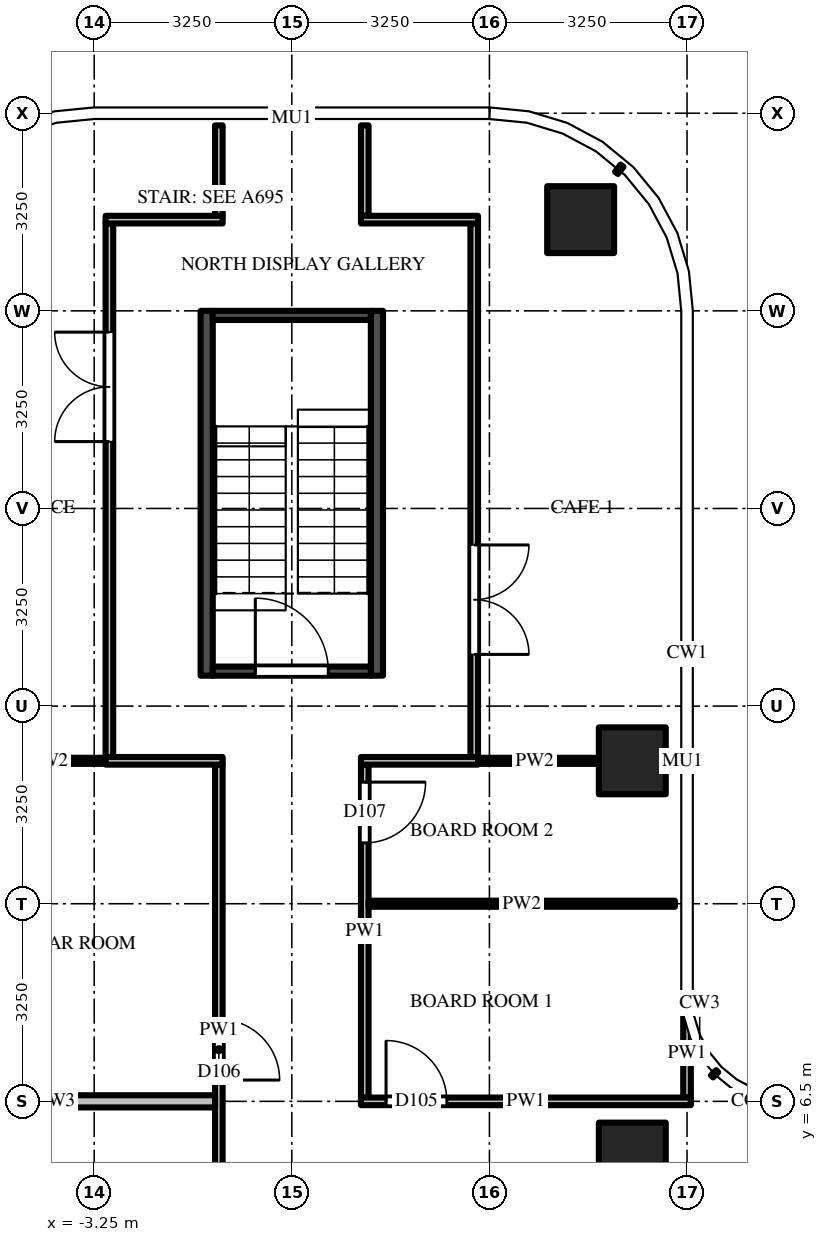
"""IFC4 building model, lengths in metres.
Left out: names, types, materials, properties, quantities, classifications, styles, units other than length and angle.
Written with IfcOpenShell. Run it as: python <this file> out.ifc"""

import sys

from ifc_helpers import new_model, si_unit, direction, frame, frame_2d, origin, origin_2d, place, context, subcontext, project, spatial, rectangle, extrude, source, transform, mapped, element, fill, save


model = new_model("IFC4")
c1 = context("Model", 3, precision=1e-05, world=origin(), true_north=direction((0.0, 1.0)))
c2 = subcontext(c1, "Body", "Model", "MODEL_VIEW")
j1 = project(units=[si_unit("LENGTHUNIT", "METRE"), si_unit("PLANEANGLEUNIT", "RADIAN")], contexts=[c1])
p1 = place(None, origin())
s1 = spatial("IfcSite", under=j1, at=p1, CompositionType="ELEMENT")
p2 = place(p1, origin())
s2 = spatial("IfcBuilding", under=s1, at=p2, CompositionType="ELEMENT")
p3 = place(p2, frame((0.0, 0.0, 244.1)))
s3 = spatial("IfcBuildingStorey", under=s2, at=p3, CompositionType="ELEMENT", Elevation=244.1)
m1 = source(origin(), c2, "Body", "SweptSolid", [
    extrude(rectangle(XDim=1.1, YDim=1.1, at=origin_2d()), origin(), (0.0, 0.0, 1.0), 3.9),
])
for number, where, z_axis, x_axis in (
    (1, (5.6, 12.1, 0.0), (0.0, 0.0, 1.0), (1.0, 0.0, 0.0)),
    (2, (4.75, 21.0, 0.0), (0.0, 0.0, 1.0), (1.0, 0.0, 0.0)),
    (3, (5.6, 5.6, 0.0), (0.0, 0.0, 1.0), (1.0, 0.0, 0.0)),
):
    element("IfcColumn", number, at=place(p3, frame(where, z_axis=z_axis, x_axis=x_axis)), inside=s3, PredefinedType="COLUMN", context=c2, shape_type="MappedRepresentation", body=[
        mapped(m1, transform((0.0, 0.0, 0.0))),
    ])
m2 = source(origin(), c2, "Body", "SweptSolid", [
    extrude(rectangle(XDim=6.0, YDim=0.2, at=frame_2d((3.0, 0.0))), origin(), (0.0, 0.0, 1.0), 3.7),
])
for number, where, z_axis, x_axis in (
    (4, (-1.4, 13.5, 0.0), (0.0, 0.0, 1.0), (0.0, 1.0, 0.0)),
    (5, (1.4, 13.5, 0.0), (0.0, 0.0, 1.0), (0.0, 1.0, 0.0)),
):
    element("IfcWall", number, at=place(p3, frame(where, z_axis=z_axis, x_axis=x_axis)), inside=s3, PredefinedType="SHEAR", context=c2, shape_type="MappedRepresentation", body=[
        mapped(m2, transform((0.0, 0.0, 0.0))),
    ])
m3 = source(origin(), c2, "Body", "SweptSolid", [
    extrude(rectangle(XDim=2.6, YDim=0.15, at=frame_2d((1.3, 0.0))), origin(), (0.0, 0.0, 1.0), 3.7),
])
p4 = place(p3, frame((-1.3, 13.575, 0.0), z_axis=(0.0, 0.0, 1.0), x_axis=(1.0, 0.0, 0.0)))
e6 = element("IfcWall", 6, at=p4, inside=s3, PredefinedType="SHEAR", context=c2, shape_type="MappedRepresentation", body=[
    mapped(m3, transform((0.0, 0.0, 0.0))),
])
m4 = source(origin(), c2, "Body", "SweptSolid", [
    extrude(rectangle(XDim=1.2, YDim=2.1, at=frame_2d((0.6, 1.05))), frame((0.0, 0.085, 0.0), z_axis=(0.0, -1.0, 0.0), x_axis=(1.0, 0.0, 0.0)), (0.0, 0.0, 1.0), 0.17),
])
p5 = place(p4, frame((0.7, 0.0, 0.0)))
e7 = element("IfcOpeningElement", 7, at=p5, cuts=e6, PredefinedType="OPENING", context=c2, shape_type="MappedRepresentation", body=[
    mapped(m4, transform((0.0, 0.0, 0.0))),
])
p6 = place(p3, frame((-1.3, 19.425, 0.0), z_axis=(0.0, 0.0, 1.0), x_axis=(1.0, 0.0, 0.0)))
e8 = element("IfcWall", 8, at=p6, inside=s3, PredefinedType="SHEAR", context=c2, shape_type="MappedRepresentation", body=[
    mapped(m3, transform((0.0, 0.0, 0.0))),
])
m5 = source(origin(), c2, "Body", "SweptSolid", [
    extrude(rectangle(XDim=8.788, YDim=0.125, at=frame_2d((4.394, 0.0))), origin(), (0.0, 0.0, 1.0), 2.78),
])
p7 = place(p3, frame((-3.0, 12.15, 0.0), z_axis=(0.0, 0.0, 1.0), x_axis=(0.0, 1.0, 0.0)))
e9 = element("IfcWall", 9, at=p7, inside=s3, PredefinedType="PARTITIONING", context=c2, shape_type="MappedRepresentation", body=[
    mapped(m5, transform((0.0, 0.0, 0.0))),
])
m6 = source(origin(), c2, "Body", "SweptSolid", [
    extrude(rectangle(XDim=1.8, YDim=2.1, at=frame_2d((0.9, 1.05))), frame((0.0, 0.073, 0.0), z_axis=(0.0, -1.0, 0.0), x_axis=(1.0, 0.0, 0.0)), (0.0, 0.0, 1.0), 0.145),
])
p8 = place(p7, frame((5.2, 0.0, 0.0)))
e10 = element("IfcOpeningElement", 10, at=p8, cuts=e9, PredefinedType="OPENING", context=c2, shape_type="MappedRepresentation", body=[
    mapped(m6, transform((0.0, 0.0, 0.0))),
])
m7 = source(origin(), c2, "Body", "SweptSolid", [
    extrude(rectangle(XDim=8.725, YDim=0.125, at=frame_2d((4.363, 0.0))), origin(), (0.0, 0.0, 1.0), 2.997),
])
p9 = place(p3, frame((-1.2, 12.038, 0.0), z_axis=(0.0, 0.0, 1.0), x_axis=(0.0, -1.0, 0.0)))
e11 = element("IfcWall", 11, at=p9, inside=s3, PredefinedType="PARTITIONING", context=c2, shape_type="MappedRepresentation", body=[
    mapped(m7, transform((0.0, 0.0, 0.0))),
])
m8 = source(origin(), c2, "Body", "SweptSolid", [
    extrude(rectangle(XDim=1.0, YDim=2.1, at=frame_2d((0.5, 1.05))), frame((0.0, 0.073, 0.0), z_axis=(0.0, -1.0, 0.0), x_axis=(1.0, 0.0, 0.0)), (0.0, 0.0, 1.0), 0.145),
])
p10 = place(p9, frame((4.188, 0.0, 0.0)))
e12 = element("IfcOpeningElement", 12, at=p10, cuts=e11, PredefinedType="OPENING", context=c2, shape_type="MappedRepresentation", body=[
    mapped(m8, transform((0.0, 0.0, 0.0))),
])
m9 = source(origin(), c2, "Body", "SweptSolid", [
    extrude(rectangle(XDim=1.488, YDim=0.125, at=frame_2d((0.744, 0.0))), origin(), (0.0, 0.0, 1.0), 2.78),
])
p11 = place(p3, frame((-1.2, 22.55, 0.0), z_axis=(0.0, 0.0, 1.0), x_axis=(0.0, -1.0, 0.0)))
e13 = element("IfcWall", 13, at=p11, inside=s3, PredefinedType="PARTITIONING", context=c2, shape_type="MappedRepresentation", body=[
    mapped(m9, transform((0.0, 0.0, 0.0))),
])
m10 = source(origin(), c2, "Body", "SweptSolid", [
    extrude(rectangle(XDim=5.475, YDim=0.125, at=frame_2d((2.738, 0.0))), origin(), (0.0, 0.0, 1.0), 2.997),
])
p12 = place(p3, frame((1.2, 12.038, 0.0), z_axis=(0.0, 0.0, 1.0), x_axis=(0.0, -1.0, 0.0)))
e14 = element("IfcWall", 14, at=p12, inside=s3, PredefinedType="PARTITIONING", context=c2, shape_type="MappedRepresentation", body=[
    mapped(m10, transform((0.0, 0.0, 0.0))),
])
p13 = place(p12, frame((0.288, 0.0, 0.0)))
e15 = element("IfcOpeningElement", 15, at=p13, cuts=e14, PredefinedType="OPENING", context=c2, shape_type="MappedRepresentation", body=[
    mapped(m8, transform((0.0, 0.0, 0.0))),
])
p14 = place(p3, frame((1.2, 22.55, 0.0), z_axis=(0.0, 0.0, 1.0), x_axis=(0.0, -1.0, 0.0)))
e16 = element("IfcWall", 16, at=p14, inside=s3, PredefinedType="PARTITIONING", context=c2, shape_type="MappedRepresentation", body=[
    mapped(m9, transform((0.0, 0.0, 0.0))),
])
p15 = place(p3, frame((3.0, 20.938, 0.0), z_axis=(0.0, 0.0, 1.0), x_axis=(0.0, -1.0, 0.0)))
e17 = element("IfcWall", 17, at=p15, inside=s3, PredefinedType="PARTITIONING", context=c2, shape_type="MappedRepresentation", body=[
    mapped(m5, transform((0.0, 0.0, 0.0))),
])
p16 = place(p15, frame((5.288, 0.0, 0.0)))
e18 = element("IfcOpeningElement", 18, at=p16, cuts=e17, PredefinedType="OPENING", context=c2, shape_type="MappedRepresentation", body=[
    mapped(m6, transform((0.0, 0.0, 0.0))),
])
m11 = source(origin(), c2, "Body", "SweptSolid", [
    extrude(rectangle(XDim=1.469, YDim=0.125, at=frame_2d((0.734, 0.0))), origin(), (0.0, 0.0, 1.0), 3.7),
])
p17 = place(p3, frame((6.5, 6.562, 0.0), z_axis=(0.0, 0.0, 1.0), x_axis=(0.0, 1.0, 0.0)))
e19 = element("IfcWall", 19, at=p17, inside=s3, PredefinedType="PARTITIONING", context=c2, shape_type="MappedRepresentation", body=[
    mapped(m11, transform((0.0, 0.0, 0.0))),
])
m12 = source(origin(), c2, "Body", "SweptSolid", [
    extrude(rectangle(XDim=5.238, YDim=0.2, at=frame_2d((2.619, 0.0))), origin(), (0.0, 0.0, 1.0), 2.78),
])
p18 = place(p3, frame((-6.5, 6.5, 0.0), z_axis=(0.0, 0.0, 1.0), x_axis=(1.0, 0.0, 0.0)))
e20 = element("IfcWall", 20, at=p18, inside=s3, PredefinedType="PARTITIONING", context=c2, shape_type="MappedRepresentation", body=[
    mapped(m12, transform((0.0, 0.0, 0.0))),
])
m13 = source(origin(), c2, "Body", "SweptSolid", [
    extrude(rectangle(XDim=5.425, YDim=0.125, at=frame_2d((2.712, 0.0))), origin(), (0.0, 0.0, 1.0), 2.78),
])
p19 = place(p3, frame((1.137, 6.5, 0.0), z_axis=(0.0, 0.0, 1.0), x_axis=(1.0, 0.0, 0.0)))
e21 = element("IfcWall", 21, at=p19, inside=s3, PredefinedType="PARTITIONING", context=c2, shape_type="MappedRepresentation", body=[
    mapped(m13, transform((0.0, 0.0, 0.0))),
])
p20 = place(p19, frame((0.413, 0.0, 0.0)))
e22 = element("IfcOpeningElement", 22, at=p20, cuts=e21, PredefinedType="OPENING", context=c2, shape_type="MappedRepresentation", body=[
    mapped(m8, transform((0.0, 0.0, 0.0))),
])
m14 = source(origin(), c2, "Body", "SweptSolid", [
    extrude(rectangle(XDim=5.038, YDim=0.1, at=frame_2d((2.519, 0.0))), origin(), (0.0, 0.0, 1.0), 2.78),
])
p21 = place(p3, frame((1.262, 9.75, 0.0), z_axis=(0.0, 0.0, 1.0), x_axis=(1.0, 0.0, 0.0)))
e23 = element("IfcWall", 23, at=p21, inside=s3, PredefinedType="PARTITIONING", context=c2, shape_type="MappedRepresentation", body=[
    mapped(m14, transform((0.0, 0.0, 0.0))),
])
m15 = source(origin(), c2, "Body", "SweptSolid", [
    extrude(rectangle(XDim=2.113, YDim=0.1, at=frame_2d((1.056, 0.0))), origin(), (0.0, 0.0, 1.0), 2.997),
])
for number, where, z_axis, x_axis in (
    (24, (-5.05, 12.1, 0.0), (0.0, 0.0, 1.0), (1.0, 0.0, 0.0)),
    (25, (2.938, 12.1, 0.0), (0.0, 0.0, 1.0), (1.0, 0.0, 0.0)),
):
    element("IfcWall", number, at=place(p3, frame(where, z_axis=z_axis, x_axis=x_axis)), inside=s3, PredefinedType="PARTITIONING", context=c2, shape_type="MappedRepresentation", body=[
        mapped(m15, transform((0.0, 0.0, 0.0))),
    ])
m16 = source(origin(), c2, "Body", "SweptSolid", [
    extrude(rectangle(XDim=1.925, YDim=0.125, at=frame_2d((0.962, 0.0))), origin(), (0.0, 0.0, 1.0), 2.997),
])
for number, where, z_axis, x_axis in (
    (26, (-1.137, 12.1, 0.0), (0.0, 0.0, 1.0), (-1.0, 0.0, 0.0)),
    (27, (3.062, 12.1, 0.0), (0.0, 0.0, 1.0), (-1.0, 0.0, 0.0)),
):
    element("IfcWall", number, at=place(p3, frame(where, z_axis=z_axis, x_axis=x_axis)), inside=s3, PredefinedType="PARTITIONING", context=c2, shape_type="MappedRepresentation", body=[
        mapped(m16, transform((0.0, 0.0, 0.0))),
    ])
m17 = source(origin(), c2, "Body", "SweptSolid", [
    extrude(rectangle(XDim=1.925, YDim=0.125, at=frame_2d((0.962, 0.0))), origin(), (0.0, 0.0, 1.0), 2.78),
])
for number, where, z_axis, x_axis in (
    (28, (-3.062, 21.0, 0.0), (0.0, 0.0, 1.0), (1.0, 0.0, 0.0)),
    (29, (1.137, 21.0, 0.0), (0.0, 0.0, 1.0), (1.0, 0.0, 0.0)),
):
    element("IfcWall", number, at=place(p3, frame(where, z_axis=z_axis, x_axis=x_axis)), inside=s3, PredefinedType="PARTITIONING", context=c2, shape_type="MappedRepresentation", body=[
        mapped(m17, transform((0.0, 0.0, 0.0))),
    ])
m18 = source(origin(), c2, "Body", "SweptSolid", [
    extrude(rectangle(XDim=1.2, YDim=2.1, at=frame_2d((0.6, 1.05))), frame((0.0, 0.025, 0.0), z_axis=(0.0, -1.0, 0.0), x_axis=(1.0, 0.0, 0.0)), (0.0, 0.0, 1.0), 0.05),
])
p22 = place(p5, origin())
e30 = element("IfcDoor", 30, at=p22, inside=s3, OperationType="SINGLE_SWING_LEFT", PredefinedType="DOOR", context=c2, shape_type="MappedRepresentation", body=[
    mapped(m18, transform((0.0, 0.0, 0.0))),
])
fill(e7, e30)
m19 = source(origin(), c2, "Body", "SweptSolid", [
    extrude(rectangle(XDim=1.0, YDim=2.1, at=frame_2d((0.5, 1.05))), frame((0.0, 0.025, 0.0), z_axis=(0.0, -1.0, 0.0), x_axis=(1.0, 0.0, 0.0)), (0.0, 0.0, 1.0), 0.05),
])
p23 = place(p20, origin())
e31 = element("IfcDoor", 31, at=p23, inside=s3, OperationType="SINGLE_SWING_LEFT", PredefinedType="DOOR", context=c2, shape_type="MappedRepresentation", body=[
    mapped(m19, transform((0.0, 0.0, 0.0))),
])
fill(e22, e31)
p24 = place(p10, origin())
e32 = element("IfcDoor", 32, at=p24, inside=s3, OperationType="SINGLE_SWING_RIGHT", PredefinedType="DOOR", context=c2, shape_type="MappedRepresentation", body=[
    mapped(m19, transform((0.0, 0.0, 0.0))),
])
fill(e12, e32)
p25 = place(p13, origin())
e33 = element("IfcDoor", 33, at=p25, inside=s3, OperationType="SINGLE_SWING_LEFT", PredefinedType="DOOR", context=c2, shape_type="MappedRepresentation", body=[
    mapped(m19, transform((0.0, 0.0, 0.0))),
])
fill(e15, e33)
m20 = source(origin(), c2, "Body", "SweptSolid", [
    extrude(rectangle(XDim=1.8, YDim=2.1, at=frame_2d((0.9, 1.05))), frame((0.0, 0.025, 0.0), z_axis=(0.0, -1.0, 0.0), x_axis=(1.0, 0.0, 0.0)), (0.0, 0.0, 1.0), 0.05),
])
p26 = place(p16, origin())
e34 = element("IfcDoor", 34, at=p26, inside=s3, OperationType="DOUBLE_DOOR_SINGLE_SWING", PredefinedType="DOOR", context=c2, shape_type="MappedRepresentation", body=[
    mapped(m20, transform((0.0, 0.0, 0.0))),
])
fill(e18, e34)
p27 = place(p8, origin())
e35 = element("IfcDoor", 35, at=p27, inside=s3, OperationType="DOUBLE_DOOR_SINGLE_SWING", PredefinedType="DOOR", context=c2, shape_type="MappedRepresentation", body=[
    mapped(m20, transform((0.0, 0.0, 0.0))),
])
fill(e10, e35)
save(model, sys.argv[1])
